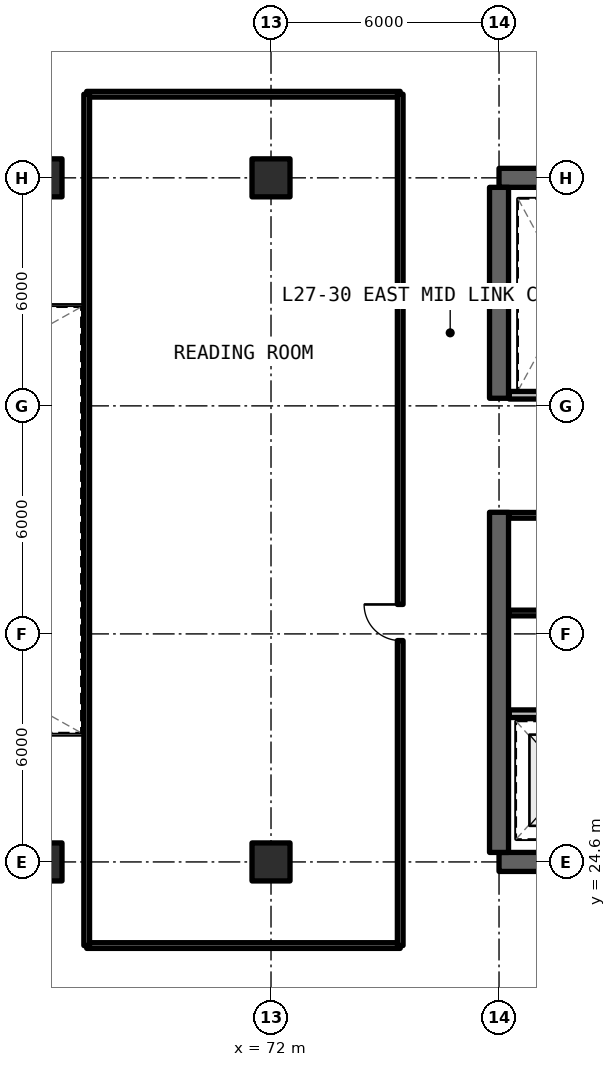
"""IFC4 building model, lengths in metres.
Left out: names, types, materials, properties, quantities, classifications, styles, units other than length and angle.
Written with IfcOpenShell. Run it as: python <this file> out.ifc"""

import sys

from ifc_helpers import new_model, si_unit, direction, frame, frame_2d, origin, origin_2d, place, context, subcontext, project, spatial, rectangle, extrude, element, fill, save


model = new_model("IFC4")
c1 = context("Model", 3, precision=1e-05, world=origin(), true_north=direction((0.0, 1.0)))
c2 = subcontext(c1, "Body", "Model", "MODEL_VIEW")
j1 = project(units=[si_unit("LENGTHUNIT", "METRE"), si_unit("PLANEANGLEUNIT", "RADIAN")], contexts=[c1])
p1 = place(None, origin())
s1 = spatial("IfcSite", under=j1, at=p1, CompositionType="ELEMENT")
p2 = place(p1, origin())
s2 = spatial("IfcBuilding", under=s1, at=p2, CompositionType="ELEMENT")
p3 = place(p2, frame((0.0, 0.0, 98.67)))
s3 = spatial("IfcBuildingStorey", under=s2, at=p3, CompositionType="ELEMENT", Elevation=98.67)
for number, where, z_axis, x_axis in (
    (1, (78.0, 24.6, 0.0), (0.0, 0.0, 1.0), (1.0, 0.0, 0.0)),
    (2, (90.0, 42.6, 0.0), (0.0, 0.0, 1.0), (-1.0, 0.0, 0.0)),
):
    element("IfcWall", number, at=place(p3, frame(where, z_axis=z_axis, x_axis=x_axis)), inside=s3, PredefinedType="SHEAR", context=c2, shape_type="SweptSolid", body=[
        extrude(rectangle(XDim=12.0, YDim=0.5, at=frame_2d((6.0, 0.0))), origin(), (0.0, 0.0, 1.0), 3.3),
    ])
p4 = place(p3, frame((78.0, 24.85, 0.0), z_axis=(0.0, 0.0, 1.0), x_axis=(0.0, 1.0, 0.0)))
e3 = element("IfcWall", 3, at=p4, inside=s3, PredefinedType="SHEAR", context=c2, shape_type="SweptSolid", body=[
    extrude(rectangle(XDim=8.95, YDim=0.5, at=frame_2d((4.475, 0.0))), origin(), (0.0, 0.0, 1.0), 3.3),
])
p5 = place(p3, frame((78.0, 36.8, 0.0), z_axis=(0.0, 0.0, 1.0), x_axis=(0.0, 1.0, 0.0)))
e4 = element("IfcWall", 4, at=p5, inside=s3, PredefinedType="SHEAR", context=c2, shape_type="SweptSolid", body=[
    extrude(rectangle(XDim=5.55, YDim=0.5, at=frame_2d((2.775, 0.0))), origin(), (0.0, 0.0, 1.0), 3.3),
])
for number, where, z_axis, x_axis in (
    (5, (66.0, 24.6, 0.0), (0.0, 0.0, 1.0), (1.0, 0.0, 0.0)),
    (6, (66.0, 42.6, 0.0), (0.0, 0.0, 1.0), (1.0, 0.0, 0.0)),
    (7, (72.0, 24.6, 0.0), (0.0, 0.0, 1.0), (1.0, 0.0, 0.0)),
    (8, (72.0, 42.6, 0.0), (0.0, 0.0, 1.0), (1.0, 0.0, 0.0)),
):
    element("IfcColumn", number, at=place(p3, frame(where, z_axis=z_axis, x_axis=x_axis)), inside=s3, PredefinedType="COLUMN", context=c2, shape_type="SweptSolid", body=[
        extrude(rectangle(XDim=1.0, YDim=1.0, at=origin_2d()), origin(), (0.0, 0.0, 1.0), 3.3),
    ])
p6 = place(p3, frame((78.27, 28.5, 0.0), z_axis=(0.0, 0.0, 1.0), x_axis=(1.0, 0.0, 0.0)))
e9 = element("IfcWall", 9, at=p6, inside=s3, PredefinedType="SOLIDWALL", context=c2, shape_type="SweptSolid", body=[
    extrude(rectangle(XDim=7.51, YDim=0.2, at=frame_2d((3.755, 0.0))), origin(), (0.0, 0.0, 1.0), 2.35),
])
p7 = place(p6, frame((3.53, 0.0, 0.0)))
e10 = element("IfcOpeningElement", 10, at=p7, cuts=e9, PredefinedType="OPENING", context=c2, shape_type="SweptSolid", body=[
    extrude(rectangle(XDim=1.0, YDim=2.15, at=frame_2d((0.5, 1.075))), frame((0.0, 0.11, 0.0), z_axis=(0.0, -1.0, 0.0), x_axis=(1.0, 0.0, 0.0)), (0.0, 0.0, 1.0), 0.22),
])
for number, where, z_axis, x_axis in (
    (11, (78.27, 31.15, 0.0), (0.0, 0.0, 1.0), (1.0, 0.0, 0.0)),
    (12, (78.27, 33.72, 0.0), (0.0, 0.0, 1.0), (1.0, 0.0, 0.0)),
):
    element("IfcWall", number, at=place(p3, frame(where, z_axis=z_axis, x_axis=x_axis)), inside=s3, PredefinedType="SOLIDWALL", context=c2, shape_type="SweptSolid", body=[
        extrude(rectangle(XDim=3.05, YDim=0.15, at=frame_2d((1.525, 0.0))), origin(), (0.0, 0.0, 1.0), 2.35),
    ])
p8 = place(p3, frame((78.27, 36.88, 0.0), z_axis=(0.0, 0.0, 1.0), x_axis=(1.0, 0.0, 0.0)))
e13 = element("IfcWall", 13, at=p8, inside=s3, PredefinedType="SOLIDWALL", context=c2, shape_type="SweptSolid", body=[
    extrude(rectangle(XDim=3.05, YDim=0.2, at=frame_2d((1.525, 0.0))), origin(), (0.0, 0.0, 1.0), 2.35),
])
for number, where, z_axis, x_axis in (
    (14, (67.15, 22.4, 0.0), (0.0, 0.0, 1.0), (1.0, 0.0, 0.0)),
    (15, (67.15, 44.8, 0.0), (0.0, 0.0, 1.0), (1.0, 0.0, 0.0)),
):
    element("IfcWall", number, at=place(p3, frame(where, z_axis=z_axis, x_axis=x_axis)), inside=s3, PredefinedType="SOLIDWALL", context=c2, shape_type="SweptSolid", body=[
        extrude(rectangle(XDim=8.25, YDim=0.15, at=frame_2d((4.125, 0.0))), origin(), (0.0, 0.0, 1.0), 2.35),
    ])
p9 = place(p3, frame((67.15, 22.4, 0.0), z_axis=(0.0, 0.0, 1.0), x_axis=(0.0, 1.0, 0.0)))
e16 = element("IfcWall", 16, at=p9, inside=s3, PredefinedType="SOLIDWALL", context=c2, shape_type="SweptSolid", body=[
    extrude(rectangle(XDim=22.4, YDim=0.15, at=frame_2d((11.2, 0.0))), origin(), (0.0, 0.0, 1.0), 2.35),
])
p10 = place(p3, frame((75.4, 22.4, 0.0), z_axis=(0.0, 0.0, 1.0), x_axis=(0.0, 1.0, 0.0)))
e17 = element("IfcWall", 17, at=p10, inside=s3, PredefinedType="SOLIDWALL", context=c2, shape_type="SweptSolid", body=[
    extrude(rectangle(XDim=22.4, YDim=0.15, at=frame_2d((11.2, 0.0))), origin(), (0.0, 0.0, 1.0), 2.35),
])
p11 = place(p10, frame((8.025, 0.0, 0.0)))
e18 = element("IfcOpeningElement", 18, at=p11, cuts=e17, PredefinedType="OPENING", context=c2, shape_type="SweptSolid", body=[
    extrude(rectangle(XDim=0.95, YDim=2.15, at=frame_2d((0.475, 1.075))), frame((0.0, 0.085, 0.0), z_axis=(0.0, -1.0, 0.0), x_axis=(1.0, 0.0, 0.0)), (0.0, 0.0, 1.0), 0.17),
])
p12 = place(p11, origin())
e19 = element("IfcDoor", 19, at=p12, inside=s3, OperationType="SINGLE_SWING_RIGHT", PredefinedType="DOOR", context=c2, shape_type="SweptSolid", body=[
    extrude(rectangle(XDim=0.95, YDim=2.15, at=frame_2d((0.475, 1.075))), frame((0.0, 0.025, 0.0), z_axis=(0.0, -1.0, 0.0), x_axis=(1.0, 0.0, 0.0)), (0.0, 0.0, 1.0), 0.05),
])
fill(e18, e19)
save(model, sys.argv[1])
